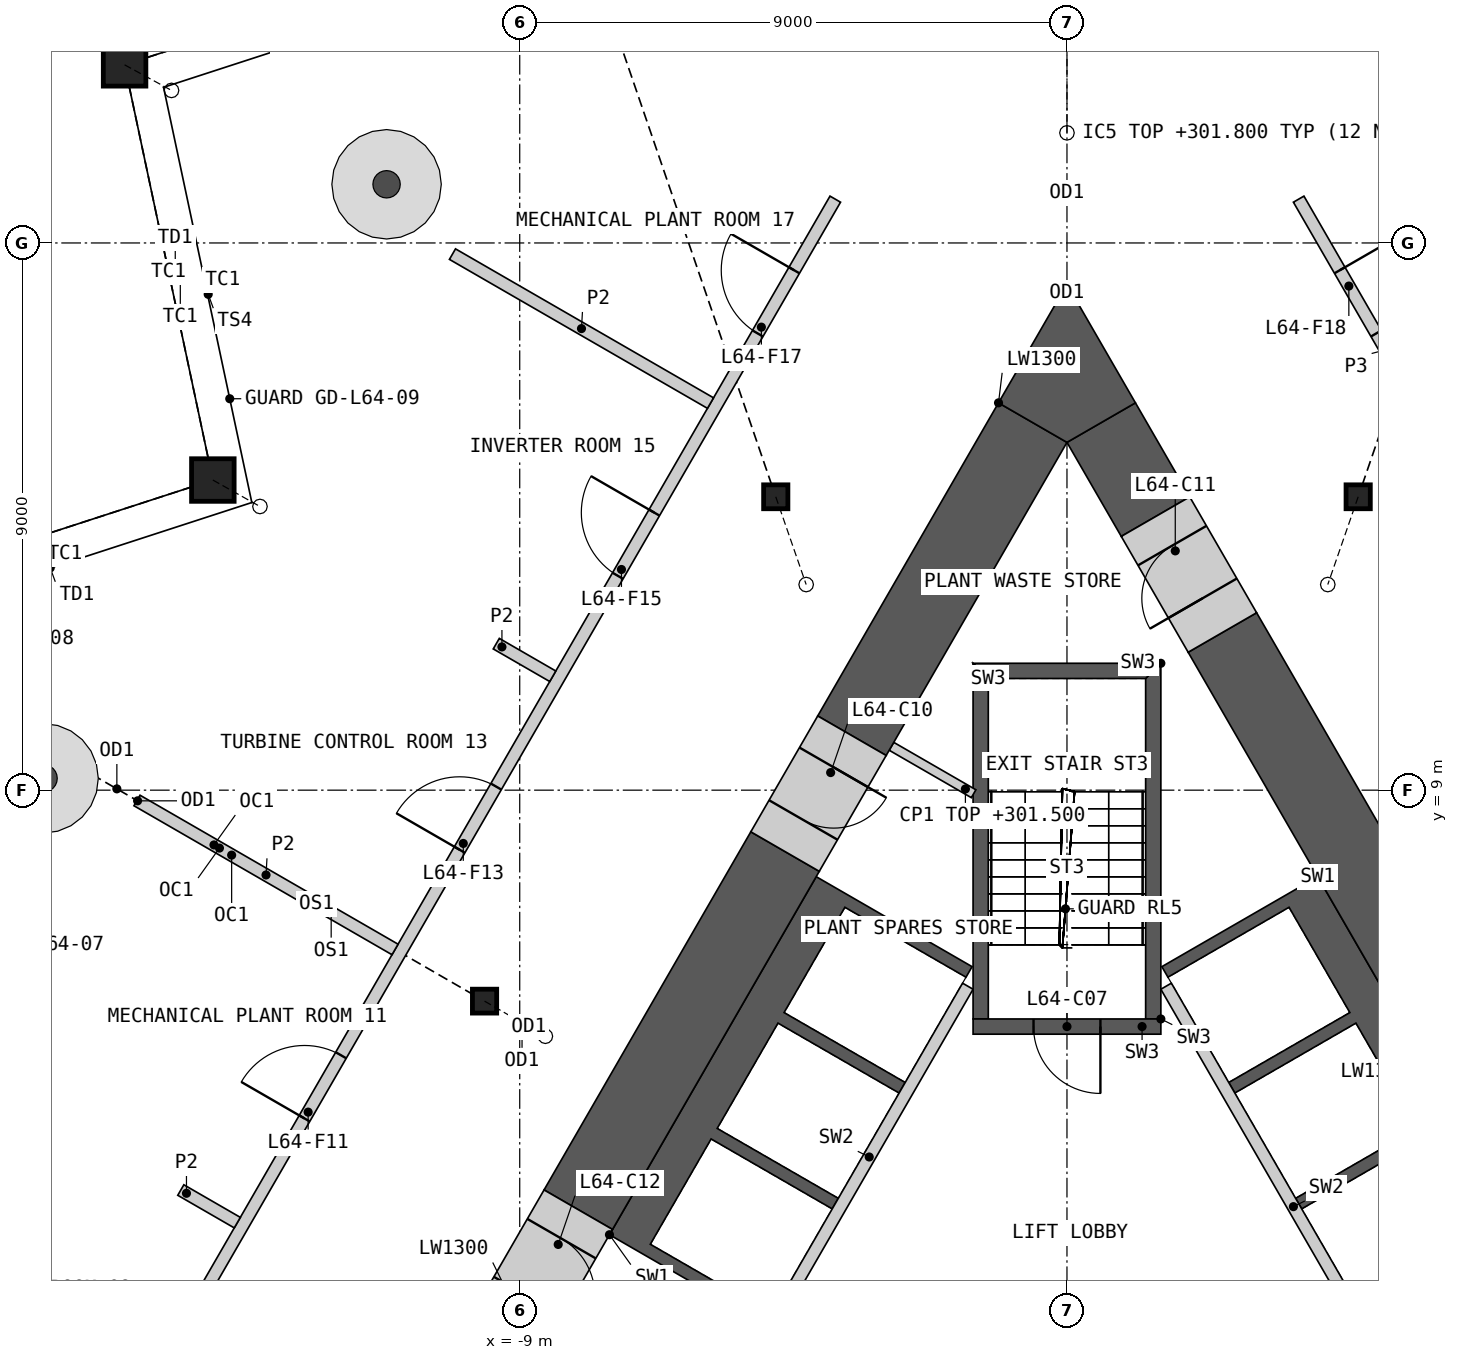
"""IFC4 building model, lengths in metres.
Left out: names, types, materials, properties, quantities, classifications, styles, units other than length and angle.
Written with IfcOpenShell. Run it as: python <this file> out.ifc"""

import sys

from ifc_helpers import new_model, si_unit, direction, frame, frame_2d, origin, origin_2d, place, context, subcontext, project, spatial, polyline, rectangle, hollow_rectangle, i_section, outline, extrude, element, fill, save


model = new_model("IFC4")
c1 = context("Model", 3, precision=1e-05, world=origin(), true_north=direction((0.0, 1.0)))
c2 = subcontext(c1, "Body", "Model", "MODEL_VIEW")
j1 = project(units=[si_unit("LENGTHUNIT", "METRE"), si_unit("PLANEANGLEUNIT", "RADIAN")], contexts=[c1])
p1 = place(None, origin())
s1 = spatial("IfcSite", under=j1, at=p1, CompositionType="ELEMENT")
p2 = place(p1, origin())
s2 = spatial("IfcBuilding", under=s1, at=p2, CompositionType="ELEMENT")
p3 = place(p2, frame((0.0, 0.0, 287.8)))
s3 = spatial("IfcBuildingStorey", under=s2, at=p3, CompositionType="ELEMENT", Elevation=287.8)
p4 = place(p3, frame((-15.499, 20.93, 0.0), z_axis=(0.055032505232, -0.029987668094, 0.998034149281), x_axis=(0.478482407054, 0.878097139353, 0.0)))
e1 = element("IfcColumn", 1, at=p4, inside=s3, PredefinedType="COLUMN", context=c2, shape_type="SweptSolid", body=[
    extrude(hollow_rectangle(XDim=0.7, YDim=0.7, WallThickness=0.045, at=origin_2d()), frame((0.0, 0.0, 0.022)), (0.0, 0.0, 1.0), 13.984),
])
p5 = place(p3, frame((-14.047, 14.101, 0.0), z_axis=(0.055239020901, -0.030995808515, 0.997991939058), x_axis=(0.48934782111, 0.872088705336, 0.0)))
e2 = element("IfcColumn", 2, at=p5, inside=s3, PredefinedType="COLUMN", context=c2, shape_type="SweptSolid", body=[
    extrude(hollow_rectangle(XDim=0.7, YDim=0.7, WallThickness=0.045, at=origin_2d()), frame((0.0, 0.0, 0.022)), (0.0, 0.0, 1.0), 13.984),
])
p6 = place(p3, frame((0.0, 22.121, 0.0), z_axis=(0.0, -0.162769302854, 0.986664154638), x_axis=(1.0, 0.0, 0.0)))
e3 = element("IfcColumn", 3, at=p6, inside=s3, PredefinedType="COLUMN", context=c2, shape_type="SweptSolid", body=[
    extrude(i_section(OverallWidth=0.399, OverallDepth=0.393, WebThickness=0.023, FlangeThickness=0.037, at=origin_2d()), frame((0.0, 0.0, 0.032)), (0.0, 0.0, 1.0), 14.124),
])
p7 = place(p3, frame((-4.789, 13.825, 0.0), z_axis=(0.035503584336, -0.102488862595, 0.994100361404), x_axis=(0.944910039342, 0.327330135415, 0.0)))
e4 = element("IfcColumn", 4, at=p7, inside=s3, PredefinedType="COLUMN", context=c2, shape_type="SweptSolid", body=[
    extrude(i_section(OverallWidth=0.399, OverallDepth=0.393, WebThickness=0.023, FlangeThickness=0.037, at=origin_2d()), frame((0.0, 0.0, 0.021)), (0.0, 0.0, 1.0), 14.04),
])
p8 = place(p3, frame((-9.578, 5.53, 0.0), z_axis=(0.071186891711, -0.041085403321, 0.996616483951), x_axis=(0.499868889286, 0.866101087359, 0.0)))
e5 = element("IfcColumn", 5, at=p8, inside=s3, PredefinedType="COLUMN", context=c2, shape_type="SweptSolid", body=[
    extrude(i_section(OverallWidth=0.399, OverallDepth=0.393, WebThickness=0.023, FlangeThickness=0.037, at=origin_2d()), frame((0.0, 0.0, 0.016)), (0.0, 0.0, 1.0), 14.015),
])
p9 = place(p3, frame((4.789, 13.825, 0.0), z_axis=(-0.035503584336, -0.102488862595, 0.994100361404), x_axis=(0.944910039342, -0.327330135415, 0.0)))
e6 = element("IfcColumn", 6, at=p9, inside=s3, PredefinedType="COLUMN", context=c2, shape_type="SweptSolid", body=[
    extrude(i_section(OverallWidth=0.399, OverallDepth=0.393, WebThickness=0.023, FlangeThickness=0.037, at=origin_2d()), frame((0.0, 0.0, 0.021)), (0.0, 0.0, 1.0), 14.04),
])
p10 = place(p3, origin())
e7 = element("IfcWall", 7, at=p10, inside=s3, PredefinedType="SHEAR", context=c2, shape_type="SweptSolid", body=[
    extrude(outline(polyline([(4.124, 7.577), (8.624, -0.217), (8.231, -0.444), (6.061, -1.697), (5.96, -1.524), (7.952, -0.374), (6.952, 1.358), (4.96, 0.208), (4.861, 0.381), (6.852, 1.531), (5.852, 3.263), (3.861, 2.113), (3.76, 2.287), (5.752, 3.437), (4.752, 5.169), (2.76, 4.019), (2.66, 4.192), (4.652, 5.342), (3.652, 7.074), (1.66, 5.924), (1.561, 6.097), (3.731, 7.35), (4.124, 7.577)])), origin(), (0.0, 0.0, 1.0), 13.7),
])
p11 = place(p3, frame((5.817, -1.476, 0.0), z_axis=(0.0, 0.0, 1.0), x_axis=(-0.500002616675, 0.866023893041, 0.0)))
e8 = element("IfcWall", 8, at=p11, inside=s3, PredefinedType="SOLIDWALL", context=c2, shape_type="SweptSolid", body=[
    extrude(rectangle(XDim=8.373, YDim=0.2, at=frame_2d((4.187, 0.0))), origin(), (0.0, 0.0, 1.0), 13.7),
])
p12 = place(p3, origin())
e9 = element("IfcWall", 9, at=p12, inside=s3, PredefinedType="SHEAR", context=c2, shape_type="SweptSolid", body=[
    extrude(outline(polyline([(-7.524, 1.688), (-4.124, 7.577), (-3.731, 7.35), (-1.561, 6.097), (-1.66, 5.924), (-3.652, 7.074), (-4.652, 5.342), (-2.66, 4.192), (-2.76, 4.019), (-4.752, 5.169), (-5.752, 3.437), (-3.76, 2.287), (-3.861, 2.113), (-5.852, 3.263), (-6.852, 1.531), (-4.861, 0.381), (-4.96, 0.208), (-7.131, 1.461), (-7.524, 1.688)])), origin(), (0.0, 0.0, 1.0), 13.7),
])
p13 = place(p3, frame((-1.631, 5.776, 0.0), z_axis=(0.0, 0.0, 1.0), x_axis=(-0.499992876559, -0.866029516466, 0.0)))
e10 = element("IfcWall", 10, at=p13, inside=s3, PredefinedType="SOLIDWALL", context=c2, shape_type="SweptSolid", body=[
    extrude(rectangle(XDim=6.486, YDim=0.2, at=frame_2d((3.243, 0.0))), origin(), (0.0, 0.0, 1.0), 13.7),
])
p14 = place(p3, origin())
e11 = element("IfcWall", 11, at=p14, inside=s3, PredefinedType="SHEAR", context=c2, shape_type="SweptSolid", body=[
    extrude(outline(polyline([(1.544, 5.237), (1.544, 11.087), (1.294, 10.837), (1.294, 5.237), (1.544, 5.237)])), origin(), (0.0, 0.0, 1.0), 13.7),
])
p15 = place(p3, origin())
e12 = element("IfcWall", 12, at=p15, inside=s3, PredefinedType="SHEAR", context=c2, shape_type="SweptSolid", body=[
    extrude(outline(polyline([(1.544, 11.087), (-1.544, 11.087), (-1.294, 10.837), (1.294, 10.837), (1.544, 11.087)])), origin(), (0.0, 0.0, 1.0), 13.7),
])
p16 = place(p3, origin())
e13 = element("IfcWall", 13, at=p16, inside=s3, PredefinedType="SHEAR", context=c2, shape_type="SweptSolid", body=[
    extrude(outline(polyline([(-1.294, 10.837), (-1.544, 11.087), (-1.544, 5.237), (-1.294, 5.237), (-1.294, 10.837)])), origin(), (0.0, 0.0, 1.0), 13.7),
])
p17 = place(p3, frame((1.544, 5.112, 0.0), z_axis=(0.0, 0.0, 1.0), x_axis=(-1.0, 0.0, 0.0)))
e14 = element("IfcWall", 14, at=p17, inside=s3, PredefinedType="SHEAR", context=c2, shape_type="SweptSolid", body=[
    extrude(rectangle(XDim=3.088, YDim=0.25, at=frame_2d((1.544, 0.0))), origin(), (0.0, 0.0, 1.0), 13.7),
])
p18 = place(p17, frame((0.994, 0.0, 0.0)))
e15 = element("IfcOpeningElement", 15, at=p18, cuts=e14, PredefinedType="OPENING", context=c2, shape_type="SweptSolid", body=[
    extrude(rectangle(XDim=1.1, YDim=2.1, at=frame_2d((0.55, 1.05))), frame((0.0, 0.135, 0.0), z_axis=(0.0, -1.0, 0.0), x_axis=(1.0, 0.0, 0.0)), (0.0, 0.0, 1.0), 0.27),
])
p19 = place(p3, frame((-2.886, 9.721, 0.0), z_axis=(0.0, 0.0, 1.0), x_axis=(0.865990094875, -0.500061151839, 0.0)))
e16 = element("IfcWall", 16, at=p19, inside=s3, PredefinedType="PARTITIONING", context=c2, shape_type="SweptSolid", body=[
    extrude(rectangle(XDim=1.56, YDim=0.15, at=frame_2d((0.78, 0.0))), origin(), (0.0, 0.0, 1.0), 13.7),
])
p20 = place(p3, frame((10.081, -1.441, 0.0), z_axis=(0.0, 0.0, 1.0), x_axis=(-0.500012180433, 0.866018371294, 0.0)))
e17 = element("IfcWall", 17, at=p20, inside=s3, PredefinedType="SHEAR", context=c2, shape_type="SweptSolid", body=[
    extrude(rectangle(XDim=15.05, YDim=1.3, at=frame_2d((7.525, 0.0))), origin(), (0.0, 0.0, 1.0), 13.7),
])
p21 = place(p3, frame((1.456, 13.499, 0.0), z_axis=(0.0, 0.0, 1.0), x_axis=(-0.499990639951, 0.866030807744, 0.0)))
e18 = element("IfcWall", 18, at=p21, inside=s3, PredefinedType="SHEAR", context=c2, shape_type="SweptSolid", body=[
    extrude(rectangle(XDim=1.786, YDim=1.3, at=frame_2d((0.893, 0.0))), origin(), (0.0, 0.0, 1.0), 13.7),
])
p22 = place(p3, frame((-4.636, 7.99, 0.0), z_axis=(0.0, 0.0, 1.0), x_axis=(-0.500022813292, -0.866012232124, 0.0)))
e19 = element("IfcWall", 19, at=p22, inside=s3, PredefinedType="SHEAR", context=c2, shape_type="SweptSolid", body=[
    extrude(rectangle(XDim=6.802, YDim=1.3, at=frame_2d((3.401, 0.0))), origin(), (0.0, 0.0, 1.0), 13.7),
])
p23 = place(p3, frame((-0.563, 15.045, 0.0), z_axis=(0.0, 0.0, 1.0), x_axis=(-0.500011498138, -0.866018765229, 0.0)))
e20 = element("IfcWall", 20, at=p23, inside=s3, PredefinedType="SHEAR", context=c2, shape_type="SweptSolid", body=[
    extrude(rectangle(XDim=5.947, YDim=1.3, at=frame_2d((2.973, 0.0))), origin(), (0.0, 0.0, 1.0), 13.7),
])
p24 = place(p3, origin())
e21 = element("IfcWall", 21, at=p24, inside=s3, PredefinedType="SHEAR", context=c2, shape_type="SweptSolid", body=[
    extrude(outline(polyline([(-1.126, 15.371), (0.0, 17.321), (1.126, 15.371), (0.0, 14.72), (-1.126, 15.371)])), origin(), (0.0, 0.0, 1.0), 13.7),
])
p25 = place(p3, frame((-3.536, 9.896, 0.0), z_axis=(0.0, 0.0, 1.0), x_axis=(-0.499981787252, -0.866035918664, 0.0)))
e22 = element("IfcWall", 22, at=p25, inside=s3, PredefinedType="SHEAR", context=c2, shape_type="SweptSolid", body=[
    extrude(rectangle(XDim=2.2, YDim=1.3, at=frame_2d((1.1, 0.0))), origin(), (0.0, 0.0, 1.0), 13.7),
])
p26 = place(p25, frame((0.6, 0.0, 0.0)))
e23 = element("IfcOpeningElement", 23, at=p26, cuts=e22, PredefinedType="OPENING", context=c2, shape_type="SweptSolid", body=[
    extrude(rectangle(XDim=1.0, YDim=2.1, at=frame_2d((0.5, 1.05))), frame((0.0, 0.66, 0.0), z_axis=(0.0, -1.0, 0.0), x_axis=(1.0, 0.0, 0.0)), (0.0, 0.0, 1.0), 1.32),
])
p27 = place(p3, frame((2.556, 11.593, 0.0), z_axis=(0.0, 0.0, 1.0), x_axis=(-0.499946605688, 0.86605622881, 0.0)))
e24 = element("IfcWall", 24, at=p27, inside=s3, PredefinedType="SHEAR", context=c2, shape_type="SweptSolid", body=[
    extrude(rectangle(XDim=2.2, YDim=1.3, at=frame_2d((1.1, 0.0))), origin(), (0.0, 0.0, 1.0), 13.7),
])
p28 = place(p27, frame((0.65, 0.0, 0.0)))
e25 = element("IfcOpeningElement", 25, at=p28, cuts=e24, PredefinedType="OPENING", context=c2, shape_type="SweptSolid", body=[
    extrude(rectangle(XDim=1.0, YDim=2.1, at=frame_2d((0.5, 1.05))), frame((0.0, 0.66, 0.0), z_axis=(0.0, -1.0, 0.0), x_axis=(1.0, 0.0, 0.0)), (0.0, 0.0, 1.0), 1.32),
])
p29 = place(p3, frame((-8.037, 2.1, 0.0), z_axis=(0.0, 0.0, 1.0), x_axis=(-0.50002983664, -0.866008176907, 0.0)))
e26 = element("IfcWall", 26, at=p29, inside=s3, PredefinedType="SHEAR", context=c2, shape_type="SweptSolid", body=[
    extrude(rectangle(XDim=2.2, YDim=1.3, at=frame_2d((1.1, 0.0))), origin(), (0.0, 0.0, 1.0), 13.7),
])
p30 = place(p29, frame((0.55, 0.0, 0.0)))
e27 = element("IfcOpeningElement", 27, at=p30, cuts=e26, PredefinedType="OPENING", context=c2, shape_type="SweptSolid", body=[
    extrude(rectangle(XDim=1.1, YDim=2.1, at=frame_2d((0.55, 1.05))), frame((0.0, 0.66, 0.0), z_axis=(0.0, -1.0, 0.0), x_axis=(1.0, 0.0, 0.0)), (0.0, 0.0, 1.0), 1.32),
])
p31 = place(p3, frame((-18.118, -6.06, 0.0), z_axis=(0.0, 0.0, 1.0), x_axis=(0.49999867524, 0.866026168633, 0.0)))
e28 = element("IfcWall", 28, at=p31, inside=s3, PredefinedType="PARTITIONING", context=c2, shape_type="SweptSolid", body=[
    extrude(rectangle(XDim=28.614, YDim=0.2, at=frame_2d((14.307, 0.0))), origin(), (0.0, 0.0, 1.0), 13.7),
])
p32 = place(p31, frame((1.351, 0.0, 0.0)))
e29 = element("IfcOpeningElement", 29, at=p32, cuts=e28, PredefinedType="OPENING", context=c2, shape_type="SweptSolid", body=[
    extrude(rectangle(XDim=1.2, YDim=2.1, at=frame_2d((0.6, 1.05))), frame((0.0, 0.11, 0.0), z_axis=(0.0, -1.0, 0.0), x_axis=(1.0, 0.0, 0.0)), (0.0, 0.0, 1.0), 0.22),
])
p33 = place(p31, frame((5.953, 0.0, 0.0)))
e30 = element("IfcOpeningElement", 30, at=p33, cuts=e28, PredefinedType="OPENING", context=c2, shape_type="SweptSolid", body=[
    extrude(rectangle(XDim=1.2, YDim=2.1, at=frame_2d((0.6, 1.05))), frame((0.0, 0.11, 0.0), z_axis=(0.0, -1.0, 0.0), x_axis=(1.0, 0.0, 0.0)), (0.0, 0.0, 1.0), 0.22),
])
p34 = place(p31, frame((11.156, 0.0, 0.0)))
e31 = element("IfcOpeningElement", 31, at=p34, cuts=e28, PredefinedType="OPENING", context=c2, shape_type="SweptSolid", body=[
    extrude(rectangle(XDim=1.2, YDim=2.1, at=frame_2d((0.6, 1.05))), frame((0.0, 0.11, 0.0), z_axis=(0.0, -1.0, 0.0), x_axis=(1.0, 0.0, 0.0)), (0.0, 0.0, 1.0), 0.22),
])
p35 = place(p31, frame((16.259, 0.0, 0.0)))
e32 = element("IfcOpeningElement", 32, at=p35, cuts=e28, PredefinedType="OPENING", context=c2, shape_type="SweptSolid", body=[
    extrude(rectangle(XDim=1.2, YDim=2.1, at=frame_2d((0.6, 1.05))), frame((0.0, 0.11, 0.0), z_axis=(0.0, -1.0, 0.0), x_axis=(1.0, 0.0, 0.0)), (0.0, 0.0, 1.0), 0.22),
])
p36 = place(p31, frame((21.461, 0.0, 0.0)))
e33 = element("IfcOpeningElement", 33, at=p36, cuts=e28, PredefinedType="OPENING", context=c2, shape_type="SweptSolid", body=[
    extrude(rectangle(XDim=1.2, YDim=2.1, at=frame_2d((0.6, 1.05))), frame((0.0, 0.11, 0.0), z_axis=(0.0, -1.0, 0.0), x_axis=(1.0, 0.0, 0.0)), (0.0, 0.0, 1.0), 0.22),
])
p37 = place(p31, frame((26.064, 0.0, 0.0)))
e34 = element("IfcOpeningElement", 34, at=p37, cuts=e28, PredefinedType="OPENING", context=c2, shape_type="SweptSolid", body=[
    extrude(rectangle(XDim=1.2, YDim=2.1, at=frame_2d((0.6, 1.05))), frame((0.0, 0.11, 0.0), z_axis=(0.0, -1.0, 0.0), x_axis=(1.0, 0.0, 0.0)), (0.0, 0.0, 1.0), 0.22),
])
p38 = place(p3, frame((3.811, 18.72, 0.0), z_axis=(0.0, 0.0, 1.0), x_axis=(0.49999867524, -0.866026168633, 0.0)))
e35 = element("IfcWall", 35, at=p38, inside=s3, PredefinedType="PARTITIONING", context=c2, shape_type="SweptSolid", body=[
    extrude(rectangle(XDim=28.614, YDim=0.2, at=frame_2d((14.307, 0.0))), origin(), (0.0, 0.0, 1.0), 13.7),
])
p39 = place(p38, frame((26.064, 0.0, 0.0)))
e36 = element("IfcOpeningElement", 36, at=p39, cuts=e35, PredefinedType="OPENING", context=c2, shape_type="SweptSolid", body=[
    extrude(rectangle(XDim=1.2, YDim=2.1, at=frame_2d((0.6, 1.05))), frame((0.0, 0.11, 0.0), z_axis=(0.0, -1.0, 0.0), x_axis=(1.0, 0.0, 0.0)), (0.0, 0.0, 1.0), 0.22),
])
p40 = place(p38, frame((21.461, 0.0, 0.0)))
e37 = element("IfcOpeningElement", 37, at=p40, cuts=e35, PredefinedType="OPENING", context=c2, shape_type="SweptSolid", body=[
    extrude(rectangle(XDim=1.2, YDim=2.1, at=frame_2d((0.6, 1.05))), frame((0.0, 0.11, 0.0), z_axis=(0.0, -1.0, 0.0), x_axis=(1.0, 0.0, 0.0)), (0.0, 0.0, 1.0), 0.22),
])
p41 = place(p38, frame((16.259, 0.0, 0.0)))
e38 = element("IfcOpeningElement", 38, at=p41, cuts=e35, PredefinedType="OPENING", context=c2, shape_type="SweptSolid", body=[
    extrude(rectangle(XDim=1.2, YDim=2.1, at=frame_2d((0.6, 1.05))), frame((0.0, 0.11, 0.0), z_axis=(0.0, -1.0, 0.0), x_axis=(1.0, 0.0, 0.0)), (0.0, 0.0, 1.0), 0.22),
])
p42 = place(p38, frame((11.156, 0.0, 0.0)))
e39 = element("IfcOpeningElement", 39, at=p42, cuts=e35, PredefinedType="OPENING", context=c2, shape_type="SweptSolid", body=[
    extrude(rectangle(XDim=1.2, YDim=2.1, at=frame_2d((0.6, 1.05))), frame((0.0, 0.11, 0.0), z_axis=(0.0, -1.0, 0.0), x_axis=(1.0, 0.0, 0.0)), (0.0, 0.0, 1.0), 0.22),
])
p43 = place(p38, frame((5.953, 0.0, 0.0)))
e40 = element("IfcOpeningElement", 40, at=p43, cuts=e35, PredefinedType="OPENING", context=c2, shape_type="SweptSolid", body=[
    extrude(rectangle(XDim=1.2, YDim=2.1, at=frame_2d((0.6, 1.05))), frame((0.0, 0.11, 0.0), z_axis=(0.0, -1.0, 0.0), x_axis=(1.0, 0.0, 0.0)), (0.0, 0.0, 1.0), 0.22),
])
p44 = place(p38, frame((1.351, 0.0, 0.0)))
e41 = element("IfcOpeningElement", 41, at=p44, cuts=e35, PredefinedType="OPENING", context=c2, shape_type="SweptSolid", body=[
    extrude(rectangle(XDim=1.2, YDim=2.1, at=frame_2d((0.6, 1.05))), frame((0.0, 0.11, 0.0), z_axis=(0.0, -1.0, 0.0), x_axis=(1.0, 0.0, 0.0)), (0.0, 0.0, 1.0), 0.22),
])
for number, where, z_axis, x_axis in (
    (42, (-10.106, 17.816, 0.0), (0.0, 0.0, 1.0), (0.866, -0.5, 0.0)),
    (43, (-15.294, 8.83, 0.0), (0.0, 0.0, 1.0), (0.866, -0.5, 0.0)),
):
    element("IfcWall", number, at=place(p3, frame(where, z_axis=z_axis, x_axis=x_axis)), inside=s3, PredefinedType="PARTITIONING", context=c2, shape_type="SweptSolid", body=[
        extrude(rectangle(XDim=4.9, YDim=0.2, at=frame_2d((2.45, 0.0))), origin(), (0.0, 0.0, 1.0), 13.7),
    ])
for number, where, z_axis, x_axis in (
    (44, (-9.385, 11.41, 0.0), (0.0, 0.0, 1.0), (0.866, -0.5, 0.0)),
    (45, (-14.574, 2.423, 0.0), (0.0, 0.0, 1.0), (0.866, -0.5, 0.0)),
):
    element("IfcWall", number, at=place(p3, frame(where, z_axis=z_axis, x_axis=x_axis)), inside=s3, PredefinedType="PARTITIONING", context=c2, shape_type="SweptSolid", body=[
        extrude(rectangle(XDim=1.073, YDim=0.2, at=frame_2d((0.536, 0.0))), origin(), (0.0, 0.0, 1.0), 13.7),
    ])
p45 = place(p18, origin())
e46 = element("IfcDoor", 46, at=p45, inside=s3, OperationType="SINGLE_SWING_LEFT", PredefinedType="DOOR", context=c2, shape_type="SweptSolid", body=[
    extrude(rectangle(XDim=1.1, YDim=2.1, at=frame_2d((0.55, 1.05))), frame((0.0, 0.025, 0.0), z_axis=(0.0, -1.0, 0.0), x_axis=(1.0, 0.0, 0.0)), (0.0, 0.0, 1.0), 0.05),
])
fill(e15, e46)
p46 = place(p26, origin())
e47 = element("IfcDoor", 47, at=p46, inside=s3, OperationType="SINGLE_SWING_LEFT", PredefinedType="DOOR", context=c2, shape_type="SweptSolid", body=[
    extrude(rectangle(XDim=1.0, YDim=2.1, at=frame_2d((0.5, 1.05))), frame((0.0, 0.405, 0.0), z_axis=(0.0, -1.0, 0.0), x_axis=(1.0, 0.0, 0.0)), (0.0, 0.0, 1.0), 0.05),
])
fill(e23, e47)
p47 = place(p28, origin())
e48 = element("IfcDoor", 48, at=p47, inside=s3, OperationType="SINGLE_SWING_LEFT", PredefinedType="DOOR", context=c2, shape_type="SweptSolid", body=[
    extrude(rectangle(XDim=1.0, YDim=2.1, at=frame_2d((0.5, 1.05))), frame((0.0, 0.405, 0.0), z_axis=(0.0, -1.0, 0.0), x_axis=(1.0, 0.0, 0.0)), (0.0, 0.0, 1.0), 0.05),
])
fill(e25, e48)
p48 = place(p30, origin())
e49 = element("IfcDoor", 49, at=p48, inside=s3, OperationType="SINGLE_SWING_RIGHT", PredefinedType="DOOR", context=c2, shape_type="SweptSolid", body=[
    extrude(rectangle(XDim=1.1, YDim=2.1, at=frame_2d((0.55, 1.05))), frame((0.0, 0.405, 0.0), z_axis=(0.0, -1.0, 0.0), x_axis=(1.0, 0.0, 0.0)), (0.0, 0.0, 1.0), 0.05),
])
fill(e27, e49)
p49 = place(p34, origin())
e50 = element("IfcDoor", 50, at=p49, inside=s3, OperationType="SINGLE_SWING_LEFT", PredefinedType="DOOR", context=c2, shape_type="SweptSolid", body=[
    extrude(rectangle(XDim=1.2, YDim=2.1, at=frame_2d((0.6, 1.05))), frame((0.0, 0.025, 0.0), z_axis=(0.0, -1.0, 0.0), x_axis=(1.0, 0.0, 0.0)), (0.0, 0.0, 1.0), 0.05),
])
fill(e31, e50)
p50 = place(p35, origin())
e51 = element("IfcDoor", 51, at=p50, inside=s3, OperationType="SINGLE_SWING_LEFT", PredefinedType="DOOR", context=c2, shape_type="SweptSolid", body=[
    extrude(rectangle(XDim=1.2, YDim=2.1, at=frame_2d((0.6, 1.05))), frame((0.0, 0.025, 0.0), z_axis=(0.0, -1.0, 0.0), x_axis=(1.0, 0.0, 0.0)), (0.0, 0.0, 1.0), 0.05),
])
fill(e32, e51)
p51 = place(p36, origin())
e52 = element("IfcDoor", 52, at=p51, inside=s3, OperationType="SINGLE_SWING_RIGHT", PredefinedType="DOOR", context=c2, shape_type="SweptSolid", body=[
    extrude(rectangle(XDim=1.2, YDim=2.1, at=frame_2d((0.6, 1.05))), frame((0.0, 0.025, 0.0), z_axis=(0.0, -1.0, 0.0), x_axis=(1.0, 0.0, 0.0)), (0.0, 0.0, 1.0), 0.05),
])
fill(e33, e52)
p52 = place(p37, origin())
e53 = element("IfcDoor", 53, at=p52, inside=s3, OperationType="SINGLE_SWING_RIGHT", PredefinedType="DOOR", context=c2, shape_type="SweptSolid", body=[
    extrude(rectangle(XDim=1.2, YDim=2.1, at=frame_2d((0.6, 1.05))), frame((0.0, 0.025, 0.0), z_axis=(0.0, -1.0, 0.0), x_axis=(1.0, 0.0, 0.0)), (0.0, 0.0, 1.0), 0.05),
])
fill(e34, e53)
p53 = place(p44, origin())
e54 = element("IfcDoor", 54, at=p53, inside=s3, OperationType="SINGLE_SWING_LEFT", PredefinedType="DOOR", context=c2, shape_type="SweptSolid", body=[
    extrude(rectangle(XDim=1.2, YDim=2.1, at=frame_2d((0.6, 1.05))), frame((0.0, 0.025, 0.0), z_axis=(0.0, -1.0, 0.0), x_axis=(1.0, 0.0, 0.0)), (0.0, 0.0, 1.0), 0.05),
])
fill(e41, e54)
save(model, sys.argv[1])
